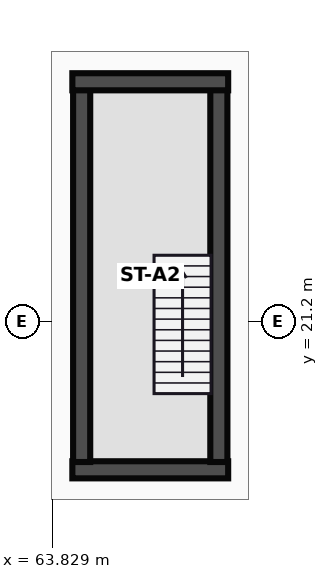
"""IFC4 building model, lengths in metres.
Left out: names, types, materials, properties, quantities, classifications, styles, units other than length and angle.
Written with IfcOpenShell. Run it as: python <this file> out.ifc"""

import sys

from ifc_helpers import new_model, si_unit, direction, frame, frame_2d, origin, place, context, subcontext, project, spatial, rectangle, extrude, source, transform, mapped, element, fill, save


model = new_model("IFC4")
c1 = context("Model", 3, precision=1e-05, world=origin(), true_north=direction((0.0, 1.0)))
c2 = subcontext(c1, "Body", "Model", "MODEL_VIEW")
j1 = project(units=[si_unit("LENGTHUNIT", "METRE"), si_unit("PLANEANGLEUNIT", "RADIAN")], contexts=[c1])
p1 = place(None, origin())
s1 = spatial("IfcSite", under=j1, at=p1, CompositionType="ELEMENT")
p2 = place(p1, origin())
s2 = spatial("IfcBuilding", under=s1, at=p2, CompositionType="ELEMENT")
p3 = place(p2, frame((0.0, 0.0, 6.0)))
s3 = spatial("IfcBuildingStorey", under=s2, at=p3, CompositionType="ELEMENT", Elevation=6.0)
m1 = source(origin(), c2, "Body", "SweptSolid", [
    extrude(rectangle(XDim=4.1, YDim=0.45, at=frame_2d((2.05, 0.0))), origin(), (0.0, 0.0, 1.0), 5.0),
])
p4 = place(p3, frame((64.35, 17.295, 0.0), z_axis=(0.0, 0.0, 1.0), x_axis=(1.0, 0.0, 0.0)))
e1 = element("IfcWall", 1, at=p4, inside=s3, PredefinedType="SHEAR", context=c2, shape_type="MappedRepresentation", body=[
    mapped(m1, transform((0.0, 0.0, 0.0))),
])
p5 = place(p4, frame((1.5, 0.0, 0.0)))
e2 = element("IfcOpeningElement", 2, at=p5, cuts=e1, PredefinedType="OPENING", context=c2, shape_type="SweptSolid", body=[
    extrude(rectangle(XDim=1.1, YDim=2.15, at=frame_2d((0.55, 1.075))), frame((0.0, 0.235, 0.0), z_axis=(0.0, -1.0, 0.0), x_axis=(1.0, 0.0, 0.0)), (0.0, 0.0, 1.0), 0.47),
])
m2 = source(origin(), c2, "Body", "SweptSolid", [
    extrude(rectangle(XDim=9.8, YDim=0.45, at=frame_2d((4.9, 0.0))), origin(), (0.0, 0.0, 1.0), 5.0),
])
for number, where, z_axis, x_axis in (
    (3, (64.595, 17.5, 0.0), (0.0, 0.0, 1.0), (0.0, 1.0, 0.0)),
    (4, (68.205, 17.5, 0.0), (0.0, 0.0, 1.0), (0.0, 1.0, 0.0)),
):
    element("IfcWall", number, at=place(p3, frame(where, z_axis=z_axis, x_axis=x_axis)), inside=s3, PredefinedType="SHEAR", context=c2, shape_type="MappedRepresentation", body=[
        mapped(m2, transform((0.0, 0.0, 0.0))),
    ])
p6 = place(p3, frame((64.35, 27.505, 0.0), z_axis=(0.0, 0.0, 1.0), x_axis=(1.0, 0.0, 0.0)))
e5 = element("IfcWall", 5, at=p6, inside=s3, PredefinedType="SHEAR", context=c2, shape_type="MappedRepresentation", body=[
    mapped(m1, transform((0.0, 0.0, 0.0))),
])
m3 = source(origin(), c2, "Body", "SweptSolid", [
    extrude(rectangle(XDim=1.1, YDim=2.15, at=frame_2d((0.55, 1.075))), frame((0.0, 0.025, 0.0), z_axis=(0.0, -1.0, 0.0), x_axis=(1.0, 0.0, 0.0)), (0.0, 0.0, 1.0), 0.05),
])
p7 = place(p5, origin())
e6 = element("IfcDoor", 6, at=p7, inside=s3, OperationType="SINGLE_SWING_RIGHT", PredefinedType="DOOR", context=c2, shape_type="MappedRepresentation", body=[
    mapped(m3, transform((0.0, 0.0, 0.0))),
])
fill(e2, e6)
save(model, sys.argv[1])
